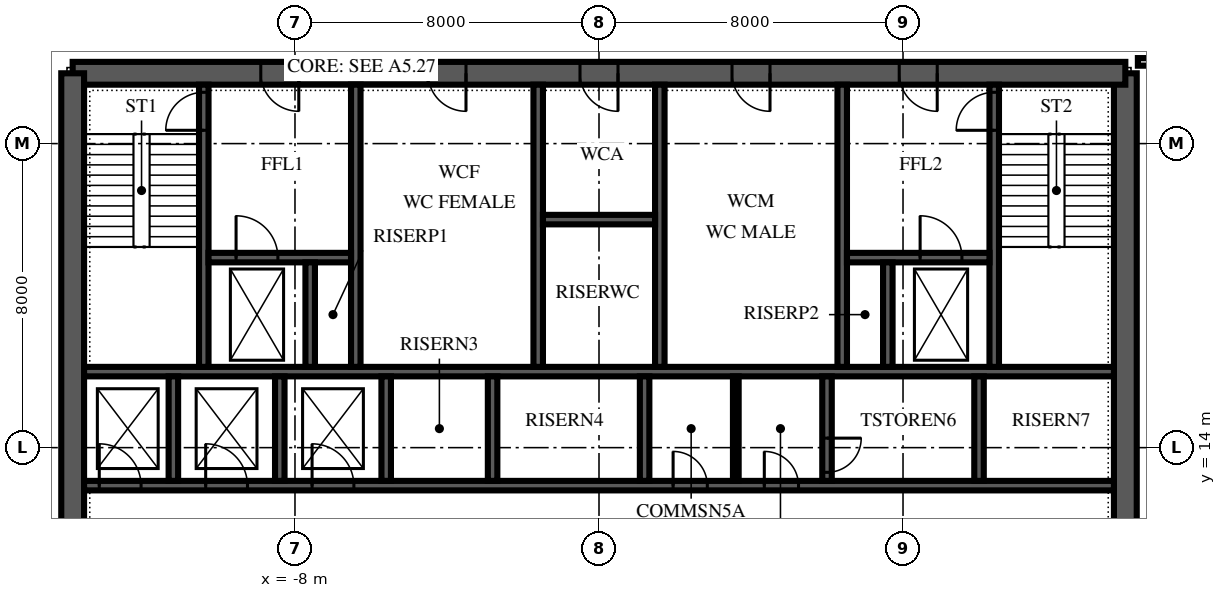
"""IFC4 building model, lengths in metres.
Left out: names, types, materials, properties, quantities, classifications, styles, units other than length and angle.
Written with IfcOpenShell. Run it as: python <this file> out.ifc"""

import sys

from ifc_helpers import new_model, si_unit, direction, frame, frame_2d, origin, place, context, subcontext, project, spatial, polyline, rectangle, outline, extrude, element, fill, save


model = new_model("IFC4")
c1 = context("Model", 3, precision=1e-05, world=origin(), true_north=direction((0.0, 1.0)))
c2 = subcontext(c1, "Body", "Model", "MODEL_VIEW")
j1 = project(units=[si_unit("LENGTHUNIT", "METRE"), si_unit("PLANEANGLEUNIT", "RADIAN")], contexts=[c1])
p1 = place(None, origin())
s1 = spatial("IfcSite", under=j1, at=p1, CompositionType="ELEMENT")
p2 = place(p1, origin())
s2 = spatial("IfcBuilding", under=s1, at=p2, CompositionType="ELEMENT")
p3 = place(p2, frame((0.0, 0.0, 182.0)))
s3 = spatial("IfcBuildingStorey", under=s2, at=p3, CompositionType="ELEMENT", Elevation=182.0)
p4 = place(p3, frame((13.85, 6.15, 0.0), z_axis=(0.0, 0.0, 1.0), x_axis=(0.0, 1.0, 0.0)))
e1 = element("IfcWall", 1, at=p4, inside=s3, PredefinedType="SHEAR", context=c2, shape_type="SweptSolid", body=[
    extrude(outline(polyline([(0.0, -0.3), (17.7, -0.3), (17.7, 0.0), (17.4, 0.0), (17.4, 0.3), (0.3, 0.3), (0.3, 0.0), (0.0, 0.0), (0.0, -0.3)])), origin(), (0.0, 0.0, 1.0), 4.0),
])
p5 = place(p4, frame((4.15, 0.0, 0.0)))
e2 = element("IfcOpeningElement", 2, at=p5, cuts=e1, PredefinedType="OPENING", context=c2, shape_type="SweptSolid", body=[
    extrude(rectangle(XDim=1.8, YDim=2.4, at=frame_2d((0.9, 1.2))), frame((0.0, 0.315, 0.0), z_axis=(0.0, -1.0, 0.0), x_axis=(1.0, 0.0, 0.0)), (0.0, 0.0, 1.0), 0.63),
])
p6 = place(p3, frame((13.85, 23.85, 0.0), z_axis=(0.0, 0.0, 1.0), x_axis=(-1.0, 0.0, 0.0)))
e3 = element("IfcWall", 3, at=p6, inside=s3, PredefinedType="SHEAR", context=c2, shape_type="SweptSolid", body=[
    extrude(rectangle(XDim=27.7, YDim=0.6, at=frame_2d((13.85, 0.0))), origin(), (0.0, 0.0, 1.0), 4.0),
])
p7 = place(p6, frame((21.75, 0.0, 0.0)))
e4 = element("IfcOpeningElement", 4, at=p7, cuts=e3, PredefinedType="OPENING", context=c2, shape_type="SweptSolid", body=[
    extrude(rectangle(XDim=1.0, YDim=2.1, at=frame_2d((0.5, 1.05))), frame((0.0, 0.315, 0.0), z_axis=(0.0, -1.0, 0.0), x_axis=(1.0, 0.0, 0.0)), (0.0, 0.0, 1.0), 0.63),
])
p8 = place(p6, frame((4.95, 0.0, 0.0)))
e5 = element("IfcOpeningElement", 5, at=p8, cuts=e3, PredefinedType="OPENING", context=c2, shape_type="SweptSolid", body=[
    extrude(rectangle(XDim=1.0, YDim=2.1, at=frame_2d((0.5, 1.05))), frame((0.0, 0.315, 0.0), z_axis=(0.0, -1.0, 0.0), x_axis=(1.0, 0.0, 0.0)), (0.0, 0.0, 1.0), 0.63),
])
p9 = place(p6, frame((17.35, 0.0, 0.0)))
e6 = element("IfcOpeningElement", 6, at=p9, cuts=e3, PredefinedType="OPENING", context=c2, shape_type="SweptSolid", body=[
    extrude(rectangle(XDim=1.0, YDim=2.1, at=frame_2d((0.5, 1.05))), frame((0.0, 0.315, 0.0), z_axis=(0.0, -1.0, 0.0), x_axis=(1.0, 0.0, 0.0)), (0.0, 0.0, 1.0), 0.63),
])
p10 = place(p6, frame((13.35, 0.0, 0.0)))
e7 = element("IfcOpeningElement", 7, at=p10, cuts=e3, PredefinedType="OPENING", context=c2, shape_type="SweptSolid", body=[
    extrude(rectangle(XDim=1.0, YDim=2.1, at=frame_2d((0.5, 1.05))), frame((0.0, 0.315, 0.0), z_axis=(0.0, -1.0, 0.0), x_axis=(1.0, 0.0, 0.0)), (0.0, 0.0, 1.0), 0.63),
])
p11 = place(p6, frame((9.35, 0.0, 0.0)))
e8 = element("IfcOpeningElement", 8, at=p11, cuts=e3, PredefinedType="OPENING", context=c2, shape_type="SweptSolid", body=[
    extrude(rectangle(XDim=1.0, YDim=2.1, at=frame_2d((0.5, 1.05))), frame((0.0, 0.315, 0.0), z_axis=(0.0, -1.0, 0.0), x_axis=(1.0, 0.0, 0.0)), (0.0, 0.0, 1.0), 0.63),
])
p12 = place(p3, frame((-13.85, 23.85, 0.0), z_axis=(0.0, 0.0, 1.0), x_axis=(0.0, -1.0, 0.0)))
e9 = element("IfcWall", 9, at=p12, inside=s3, PredefinedType="SHEAR", context=c2, shape_type="SweptSolid", body=[
    extrude(outline(polyline([(0.0, -0.3), (17.7, -0.3), (17.7, 0.0), (17.4, 0.0), (17.4, 0.3), (0.3, 0.3), (0.3, 0.0), (0.0, 0.0), (0.0, -0.3)])), origin(), (0.0, 0.0, 1.0), 4.0),
])
p13 = place(p12, frame((11.75, 0.0, 0.0)))
e10 = element("IfcOpeningElement", 10, at=p13, cuts=e9, PredefinedType="OPENING", context=c2, shape_type="SweptSolid", body=[
    extrude(rectangle(XDim=1.8, YDim=2.4, at=frame_2d((0.9, 1.2))), frame((0.0, 0.315, 0.0), z_axis=(0.0, -1.0, 0.0), x_axis=(1.0, 0.0, 0.0)), (0.0, 0.0, 1.0), 0.63),
])
p14 = place(p3, frame((-13.55, 13.0, 0.0), z_axis=(0.0, 0.0, 1.0), x_axis=(1.0, 0.0, 0.0)))
e11 = element("IfcWall", 11, at=p14, inside=s3, PredefinedType="SHEAR", context=c2, shape_type="SweptSolid", body=[
    extrude(rectangle(XDim=27.1, YDim=0.25, at=frame_2d((13.55, 0.0))), origin(), (0.0, 0.0, 1.0), 4.0),
])
p15 = place(p14, frame((0.4, 0.0, 0.0)))
e12 = element("IfcOpeningElement", 12, at=p15, cuts=e11, PredefinedType="OPENING", context=c2, shape_type="SweptSolid", body=[
    extrude(rectangle(XDim=1.1, YDim=2.1, at=frame_2d((0.55, 1.05))), frame((0.0, 0.14, 0.0), z_axis=(0.0, -1.0, 0.0), x_axis=(1.0, 0.0, 0.0)), (0.0, 0.0, 1.0), 0.28),
])
p16 = place(p14, frame((3.2, 0.0, 0.0)))
e13 = element("IfcOpeningElement", 13, at=p16, cuts=e11, PredefinedType="OPENING", context=c2, shape_type="SweptSolid", body=[
    extrude(rectangle(XDim=1.1, YDim=2.1, at=frame_2d((0.55, 1.05))), frame((0.0, 0.14, 0.0), z_axis=(0.0, -1.0, 0.0), x_axis=(1.0, 0.0, 0.0)), (0.0, 0.0, 1.0), 0.28),
])
p17 = place(p14, frame((6.0, 0.0, 0.0)))
e14 = element("IfcOpeningElement", 14, at=p17, cuts=e11, PredefinedType="OPENING", context=c2, shape_type="SweptSolid", body=[
    extrude(rectangle(XDim=1.1, YDim=2.1, at=frame_2d((0.55, 1.05))), frame((0.0, 0.14, 0.0), z_axis=(0.0, -1.0, 0.0), x_axis=(1.0, 0.0, 0.0)), (0.0, 0.0, 1.0), 0.28),
])
p18 = place(p14, frame((15.5, 0.0, 0.0)))
e15 = element("IfcOpeningElement", 15, at=p18, cuts=e11, PredefinedType="OPENING", context=c2, shape_type="SweptSolid", body=[
    extrude(rectangle(XDim=0.9, YDim=2.1, at=frame_2d((0.45, 1.05))), frame((0.0, 0.14, 0.0), z_axis=(0.0, -1.0, 0.0), x_axis=(1.0, 0.0, 0.0)), (0.0, 0.0, 1.0), 0.28),
])
p19 = place(p14, frame((17.9, 0.0, 0.0)))
e16 = element("IfcOpeningElement", 16, at=p19, cuts=e11, PredefinedType="OPENING", context=c2, shape_type="SweptSolid", body=[
    extrude(rectangle(XDim=0.9, YDim=2.1, at=frame_2d((0.45, 1.05))), frame((0.0, 0.14, 0.0), z_axis=(0.0, -1.0, 0.0), x_axis=(1.0, 0.0, 0.0)), (0.0, 0.0, 1.0), 0.28),
])
p20 = place(p3, frame((-13.55, 16.0, 0.0), z_axis=(0.0, 0.0, 1.0), x_axis=(1.0, 0.0, 0.0)))
e17 = element("IfcWall", 17, at=p20, inside=s3, PredefinedType="SHEAR", context=c2, shape_type="SweptSolid", body=[
    extrude(rectangle(XDim=27.1, YDim=0.25, at=frame_2d((13.55, 0.0))), origin(), (0.0, 0.0, 1.0), 4.0),
])
for number, where, z_axis, x_axis in (
    (18, (-11.2, 13.125, 0.0), (0.0, 0.0, 1.0), (0.0, 1.0, 0.0)),
    (19, (-8.4, 13.125, 0.0), (0.0, 0.0, 1.0), (0.0, 1.0, 0.0)),
    (20, (-5.6, 13.125, 0.0), (0.0, 0.0, 1.0), (0.0, 1.0, 0.0)),
    (21, (-2.8, 13.125, 0.0), (0.0, 0.0, 1.0), (0.0, 1.0, 0.0)),
    (22, (1.2, 13.125, 0.0), (0.0, 0.0, 1.0), (0.0, 1.0, 0.0)),
):
    element("IfcWall", number, at=place(p3, frame(where, z_axis=z_axis, x_axis=x_axis)), inside=s3, PredefinedType="SHEAR", context=c2, shape_type="SweptSolid", body=[
        extrude(rectangle(XDim=2.75, YDim=0.25, at=frame_2d((1.375, 0.0))), origin(), (0.0, 0.0, 1.0), 4.0),
    ])
p21 = place(p3, frame((6.0, 13.125, 0.0), z_axis=(0.0, 0.0, 1.0), x_axis=(0.0, 1.0, 0.0)))
e23 = element("IfcWall", 23, at=p21, inside=s3, PredefinedType="SHEAR", context=c2, shape_type="SweptSolid", body=[
    extrude(rectangle(XDim=2.75, YDim=0.25, at=frame_2d((1.375, 0.0))), origin(), (0.0, 0.0, 1.0), 4.0),
])
p22 = place(p21, frame((0.225, 0.0, 0.0)))
e24 = element("IfcOpeningElement", 24, at=p22, cuts=e23, PredefinedType="OPENING", context=c2, shape_type="SweptSolid", body=[
    extrude(rectangle(XDim=0.9, YDim=2.1, at=frame_2d((0.45, 1.05))), frame((0.0, 0.14, 0.0), z_axis=(0.0, -1.0, 0.0), x_axis=(1.0, 0.0, 0.0)), (0.0, 0.0, 1.0), 0.28),
])
p23 = place(p3, frame((10.0, 13.125, 0.0), z_axis=(0.0, 0.0, 1.0), x_axis=(0.0, 1.0, 0.0)))
e25 = element("IfcWall", 25, at=p23, inside=s3, PredefinedType="SHEAR", context=c2, shape_type="SweptSolid", body=[
    extrude(rectangle(XDim=2.75, YDim=0.25, at=frame_2d((1.375, 0.0))), origin(), (0.0, 0.0, 1.0), 4.0),
])
p24 = place(p3, frame((-10.4, 16.125, 0.0), z_axis=(0.0, 0.0, 1.0), x_axis=(0.0, 1.0, 0.0)))
e26 = element("IfcWall", 26, at=p24, inside=s3, PredefinedType="SHEAR", context=c2, shape_type="SweptSolid", body=[
    extrude(rectangle(XDim=7.425, YDim=0.25, at=frame_2d((3.712, 0.0))), origin(), (0.0, 0.0, 1.0), 4.0),
])
p25 = place(p24, frame((6.225, 0.0, 0.0)))
e27 = element("IfcOpeningElement", 27, at=p25, cuts=e26, PredefinedType="OPENING", context=c2, shape_type="SweptSolid", body=[
    extrude(rectangle(XDim=1.0, YDim=2.1, at=frame_2d((0.5, 1.05))), frame((0.0, 0.14, 0.0), z_axis=(0.0, -1.0, 0.0), x_axis=(1.0, 0.0, 0.0)), (0.0, 0.0, 1.0), 0.28),
])
for number, where, z_axis, x_axis in (
    (28, (-6.4, 16.125, 0.0), (0.0, 0.0, 1.0), (0.0, 1.0, 0.0)),
    (29, (-1.6, 16.125, 0.0), (0.0, 0.0, 1.0), (0.0, 1.0, 0.0)),
    (30, (1.6, 16.125, 0.0), (0.0, 0.0, 1.0), (0.0, 1.0, 0.0)),
    (31, (6.4, 16.125, 0.0), (0.0, 0.0, 1.0), (0.0, 1.0, 0.0)),
):
    element("IfcWall", number, at=place(p3, frame(where, z_axis=z_axis, x_axis=x_axis)), inside=s3, PredefinedType="SHEAR", context=c2, shape_type="SweptSolid", body=[
        extrude(rectangle(XDim=7.425, YDim=0.25, at=frame_2d((3.712, 0.0))), origin(), (0.0, 0.0, 1.0), 4.0),
    ])
p26 = place(p3, frame((10.4, 16.125, 0.0), z_axis=(0.0, 0.0, 1.0), x_axis=(0.0, 1.0, 0.0)))
e32 = element("IfcWall", 32, at=p26, inside=s3, PredefinedType="SHEAR", context=c2, shape_type="SweptSolid", body=[
    extrude(rectangle(XDim=7.425, YDim=0.25, at=frame_2d((3.712, 0.0))), origin(), (0.0, 0.0, 1.0), 4.0),
])
p27 = place(p26, frame((6.225, 0.0, 0.0)))
e33 = element("IfcOpeningElement", 33, at=p27, cuts=e32, PredefinedType="OPENING", context=c2, shape_type="SweptSolid", body=[
    extrude(rectangle(XDim=1.0, YDim=2.1, at=frame_2d((0.5, 1.05))), frame((0.0, 0.14, 0.0), z_axis=(0.0, -1.0, 0.0), x_axis=(1.0, 0.0, 0.0)), (0.0, 0.0, 1.0), 0.28),
])
p28 = place(p3, frame((-10.275, 19.0, 0.0), z_axis=(0.0, 0.0, 1.0), x_axis=(1.0, 0.0, 0.0)))
e34 = element("IfcWall", 34, at=p28, inside=s3, PredefinedType="SHEAR", context=c2, shape_type="SweptSolid", body=[
    extrude(rectangle(XDim=3.75, YDim=0.25, at=frame_2d((1.875, 0.0))), origin(), (0.0, 0.0, 1.0), 4.0),
])
p29 = place(p28, frame((0.725, 0.0, 0.0)))
e35 = element("IfcOpeningElement", 35, at=p29, cuts=e34, PredefinedType="OPENING", context=c2, shape_type="SweptSolid", body=[
    extrude(rectangle(XDim=1.1, YDim=2.1, at=frame_2d((0.55, 1.05))), frame((0.0, 0.14, 0.0), z_axis=(0.0, -1.0, 0.0), x_axis=(1.0, 0.0, 0.0)), (0.0, 0.0, 1.0), 0.28),
])
p30 = place(p3, frame((6.525, 19.0, 0.0), z_axis=(0.0, 0.0, 1.0), x_axis=(1.0, 0.0, 0.0)))
e36 = element("IfcWall", 36, at=p30, inside=s3, PredefinedType="SHEAR", context=c2, shape_type="SweptSolid", body=[
    extrude(rectangle(XDim=3.75, YDim=0.25, at=frame_2d((1.875, 0.0))), origin(), (0.0, 0.0, 1.0), 4.0),
])
p31 = place(p30, frame((1.925, 0.0, 0.0)))
e37 = element("IfcOpeningElement", 37, at=p31, cuts=e36, PredefinedType="OPENING", context=c2, shape_type="SweptSolid", body=[
    extrude(rectangle(XDim=1.1, YDim=2.1, at=frame_2d((0.55, 1.05))), frame((0.0, 0.14, 0.0), z_axis=(0.0, -1.0, 0.0), x_axis=(1.0, 0.0, 0.0)), (0.0, 0.0, 1.0), 0.28),
])
for number, where, z_axis, x_axis in (
    (38, (-7.6, 16.125, 0.0), (0.0, 0.0, 1.0), (0.0, 1.0, 0.0)),
    (39, (7.6, 16.125, 0.0), (0.0, 0.0, 1.0), (0.0, 1.0, 0.0)),
):
    element("IfcWall", number, at=place(p3, frame(where, z_axis=z_axis, x_axis=x_axis)), inside=s3, PredefinedType="SHEAR", context=c2, shape_type="SweptSolid", body=[
        extrude(rectangle(XDim=2.75, YDim=0.25, at=frame_2d((1.375, 0.0))), origin(), (0.0, 0.0, 1.0), 4.0),
    ])
p32 = place(p3, frame((-1.475, 20.0, 0.0), z_axis=(0.0, 0.0, 1.0), x_axis=(1.0, 0.0, 0.0)))
e40 = element("IfcWall", 40, at=p32, inside=s3, PredefinedType="SHEAR", context=c2, shape_type="SweptSolid", body=[
    extrude(rectangle(XDim=2.95, YDim=0.25, at=frame_2d((1.475, 0.0))), origin(), (0.0, 0.0, 1.0), 4.0),
])
p33 = place(p3, frame((3.6, 13.125, 0.0), z_axis=(0.0, 0.0, 1.0), x_axis=(0.0, 1.0, 0.0)))
e41 = element("IfcWall", 41, at=p33, inside=s3, PredefinedType="PARTITIONING", context=c2, shape_type="SweptSolid", body=[
    extrude(rectangle(XDim=2.75, YDim=0.15, at=frame_2d((1.375, 0.0))), origin(), (0.0, 0.0, 1.0), 3.85),
])
p34 = place(p3, frame((14.18, 24.15, 0.0), z_axis=(0.0, 0.0, 1.0), x_axis=(1.0, 0.0, 0.0)))
e42 = element("IfcWall", 42, at=p34, inside=s3, PredefinedType="PARTITIONING", context=c2, shape_type="SweptSolid", body=[
    extrude(rectangle(XDim=1.92, YDim=0.2, at=frame_2d((0.96, 0.0))), origin(), (0.0, 0.0, 1.0), 3.4),
])
p35 = place(p7, origin())
e43 = element("IfcDoor", 43, at=p35, inside=s3, OperationType="SINGLE_SWING_RIGHT", PredefinedType="DOOR", context=c2, shape_type="SweptSolid", body=[
    extrude(rectangle(XDim=1.0, YDim=2.1, at=frame_2d((0.5, 1.05))), frame((0.0, 0.3, 0.0), z_axis=(0.0, -1.0, 0.0), x_axis=(1.0, 0.0, 0.0)), (0.0, 0.0, 1.0), 0.6),
])
fill(e4, e43)
p36 = place(p8, origin())
e44 = element("IfcDoor", 44, at=p36, inside=s3, OperationType="SINGLE_SWING_RIGHT", PredefinedType="DOOR", context=c2, shape_type="SweptSolid", body=[
    extrude(rectangle(XDim=1.0, YDim=2.1, at=frame_2d((0.5, 1.05))), frame((0.0, 0.3, 0.0), z_axis=(0.0, -1.0, 0.0), x_axis=(1.0, 0.0, 0.0)), (0.0, 0.0, 1.0), 0.6),
])
fill(e5, e44)
p37 = place(p9, origin())
e45 = element("IfcDoor", 45, at=p37, inside=s3, OperationType="SINGLE_SWING_LEFT", PredefinedType="DOOR", context=c2, shape_type="SweptSolid", body=[
    extrude(rectangle(XDim=1.0, YDim=2.1, at=frame_2d((0.5, 1.05))), frame((0.0, 0.3, 0.0), z_axis=(0.0, -1.0, 0.0), x_axis=(1.0, 0.0, 0.0)), (0.0, 0.0, 1.0), 0.6),
])
fill(e6, e45)
p38 = place(p10, origin())
e46 = element("IfcDoor", 46, at=p38, inside=s3, OperationType="SINGLE_SWING_LEFT", PredefinedType="DOOR", context=c2, shape_type="SweptSolid", body=[
    extrude(rectangle(XDim=1.0, YDim=2.1, at=frame_2d((0.5, 1.05))), frame((0.0, 0.3, 0.0), z_axis=(0.0, -1.0, 0.0), x_axis=(1.0, 0.0, 0.0)), (0.0, 0.0, 1.0), 0.6),
])
fill(e7, e46)
p39 = place(p11, origin())
e47 = element("IfcDoor", 47, at=p39, inside=s3, OperationType="SINGLE_SWING_LEFT", PredefinedType="DOOR", context=c2, shape_type="SweptSolid", body=[
    extrude(rectangle(XDim=1.0, YDim=2.1, at=frame_2d((0.5, 1.05))), frame((0.0, 0.3, 0.0), z_axis=(0.0, -1.0, 0.0), x_axis=(1.0, 0.0, 0.0)), (0.0, 0.0, 1.0), 0.6),
])
fill(e8, e47)
p40 = place(p25, origin())
e48 = element("IfcDoor", 48, at=p40, inside=s3, OperationType="SINGLE_SWING_LEFT", PredefinedType="DOOR", context=c2, shape_type="SweptSolid", body=[
    extrude(rectangle(XDim=1.0, YDim=2.1, at=frame_2d((0.5, 1.05))), frame((0.0, 0.125, 0.0), z_axis=(0.0, -1.0, 0.0), x_axis=(1.0, 0.0, 0.0)), (0.0, 0.0, 1.0), 0.25),
])
fill(e27, e48)
p41 = place(p27, origin())
e49 = element("IfcDoor", 49, at=p41, inside=s3, OperationType="SINGLE_SWING_LEFT", PredefinedType="DOOR", context=c2, shape_type="SweptSolid", body=[
    extrude(rectangle(XDim=1.0, YDim=2.1, at=frame_2d((0.5, 1.05))), frame((0.0, 0.125, 0.0), z_axis=(0.0, -1.0, 0.0), x_axis=(1.0, 0.0, 0.0)), (0.0, 0.0, 1.0), 0.25),
])
fill(e33, e49)
p42 = place(p15, origin())
e50 = element("IfcDoor", 50, at=p42, inside=s3, OperationType="SLIDING_TO_LEFT", PredefinedType="DOOR", context=c2, shape_type="SweptSolid", body=[
    extrude(rectangle(XDim=1.1, YDim=2.1, at=frame_2d((0.55, 1.05))), frame((0.0, 0.125, 0.0), z_axis=(0.0, -1.0, 0.0), x_axis=(1.0, 0.0, 0.0)), (0.0, 0.0, 1.0), 0.25),
])
fill(e12, e50)
p43 = place(p16, origin())
e51 = element("IfcDoor", 51, at=p43, inside=s3, OperationType="SLIDING_TO_LEFT", PredefinedType="DOOR", context=c2, shape_type="SweptSolid", body=[
    extrude(rectangle(XDim=1.1, YDim=2.1, at=frame_2d((0.55, 1.05))), frame((0.0, 0.125, 0.0), z_axis=(0.0, -1.0, 0.0), x_axis=(1.0, 0.0, 0.0)), (0.0, 0.0, 1.0), 0.25),
])
fill(e13, e51)
p44 = place(p17, origin())
e52 = element("IfcDoor", 52, at=p44, inside=s3, OperationType="SLIDING_TO_LEFT", PredefinedType="DOOR", context=c2, shape_type="SweptSolid", body=[
    extrude(rectangle(XDim=1.1, YDim=2.1, at=frame_2d((0.55, 1.05))), frame((0.0, 0.125, 0.0), z_axis=(0.0, -1.0, 0.0), x_axis=(1.0, 0.0, 0.0)), (0.0, 0.0, 1.0), 0.25),
])
fill(e14, e52)
p45 = place(p31, origin())
e53 = element("IfcDoor", 53, at=p45, inside=s3, OperationType="SLIDING_TO_RIGHT", PredefinedType="DOOR", context=c2, shape_type="SweptSolid", body=[
    extrude(rectangle(XDim=1.1, YDim=2.1, at=frame_2d((0.55, 1.05))), frame((0.0, 0.125, 0.0), z_axis=(0.0, -1.0, 0.0), x_axis=(1.0, 0.0, 0.0)), (0.0, 0.0, 1.0), 0.25),
])
fill(e37, e53)
p46 = place(p29, origin())
e54 = element("IfcDoor", 54, at=p46, inside=s3, OperationType="SLIDING_TO_RIGHT", PredefinedType="DOOR", context=c2, shape_type="SweptSolid", body=[
    extrude(rectangle(XDim=1.1, YDim=2.1, at=frame_2d((0.55, 1.05))), frame((0.0, 0.125, 0.0), z_axis=(0.0, -1.0, 0.0), x_axis=(1.0, 0.0, 0.0)), (0.0, 0.0, 1.0), 0.25),
])
fill(e35, e54)
p47 = place(p18, origin())
e55 = element("IfcDoor", 55, at=p47, inside=s3, OperationType="SINGLE_SWING_LEFT", PredefinedType="DOOR", context=c2, shape_type="SweptSolid", body=[
    extrude(rectangle(XDim=0.9, YDim=2.1, at=frame_2d((0.45, 1.05))), frame((0.0, 0.125, 0.0), z_axis=(0.0, -1.0, 0.0), x_axis=(1.0, 0.0, 0.0)), (0.0, 0.0, 1.0), 0.25),
])
fill(e15, e55)
p48 = place(p19, origin())
e56 = element("IfcDoor", 56, at=p48, inside=s3, OperationType="SINGLE_SWING_LEFT", PredefinedType="DOOR", context=c2, shape_type="SweptSolid", body=[
    extrude(rectangle(XDim=0.9, YDim=2.1, at=frame_2d((0.45, 1.05))), frame((0.0, 0.125, 0.0), z_axis=(0.0, -1.0, 0.0), x_axis=(1.0, 0.0, 0.0)), (0.0, 0.0, 1.0), 0.25),
])
fill(e16, e56)
p49 = place(p22, frame((0.9, 0.0, 0.0), z_axis=(0.0, 0.0, 1.0), x_axis=(-1.0, 0.0, 0.0)))
e57 = element("IfcDoor", 57, at=p49, inside=s3, OperationType="SINGLE_SWING_LEFT", PredefinedType="DOOR", context=c2, shape_type="SweptSolid", body=[
    extrude(rectangle(XDim=0.9, YDim=2.1, at=frame_2d((0.45, 1.05))), frame((0.0, 0.125, 0.0), z_axis=(0.0, -1.0, 0.0), x_axis=(1.0, 0.0, 0.0)), (0.0, 0.0, 1.0), 0.25),
])
fill(e24, e57)
save(model, sys.argv[1])
